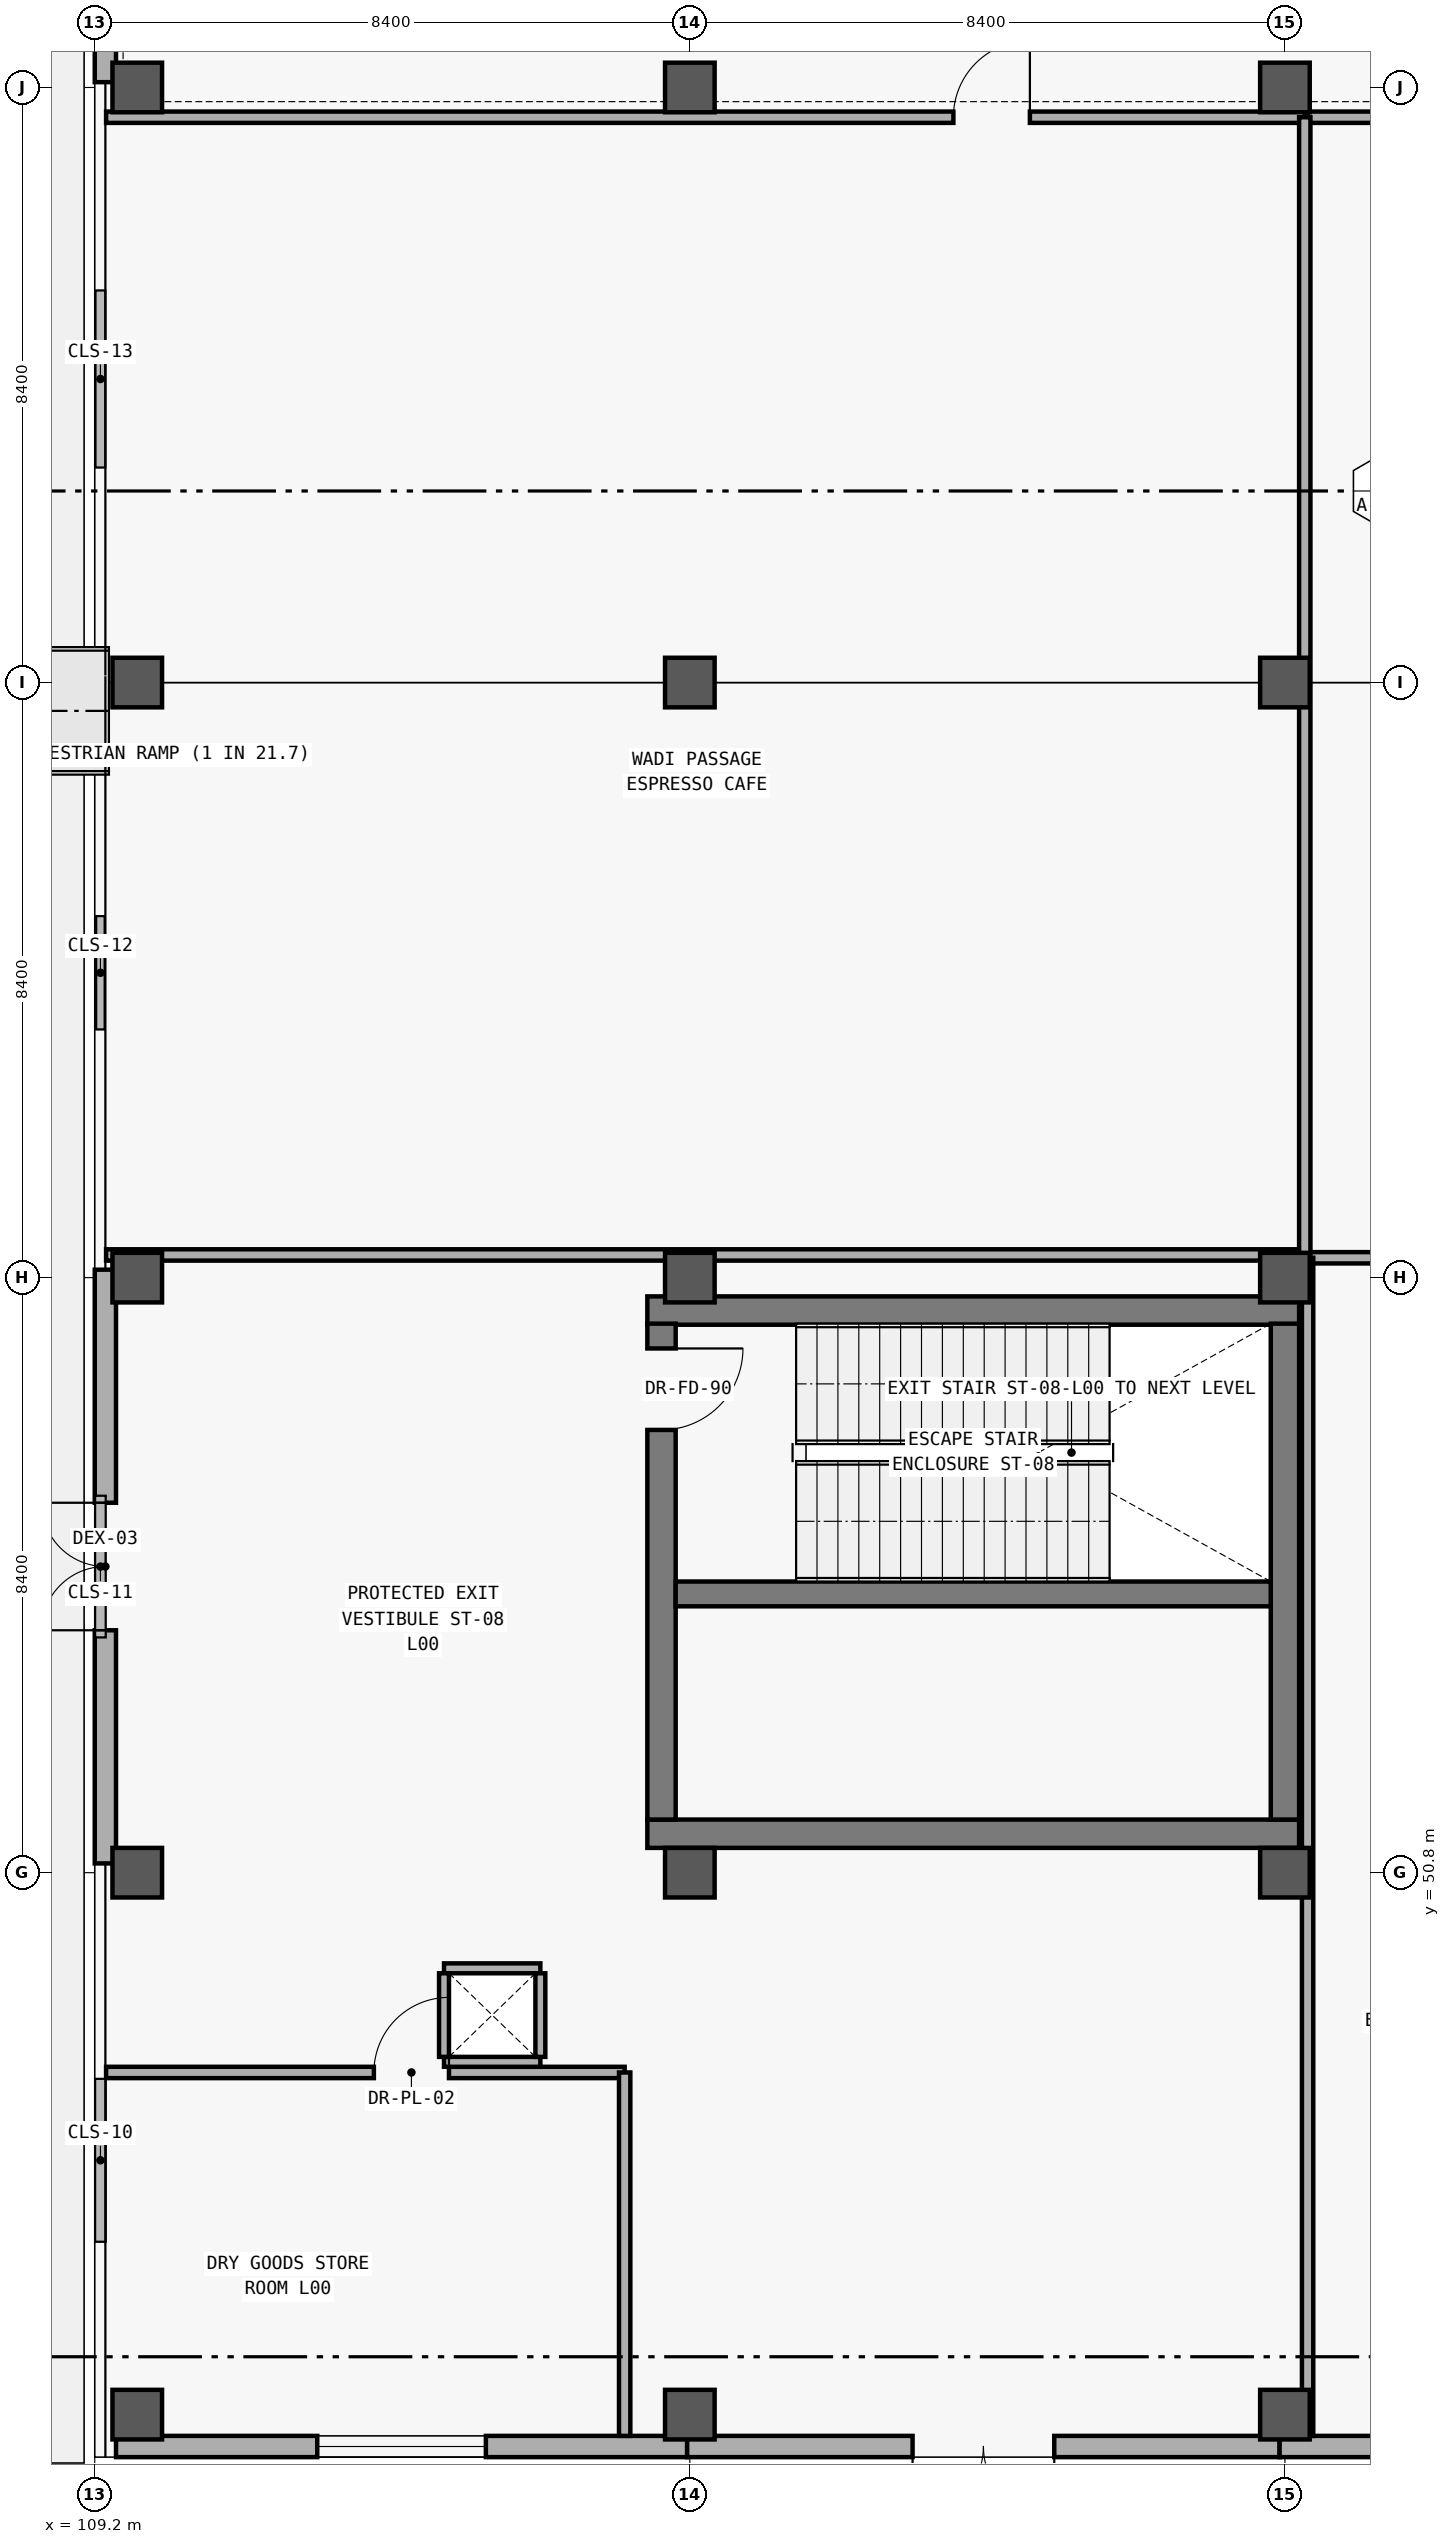
"""IFC4 building model, lengths in metres.
Left out: names, types, materials, properties, quantities, classifications, styles, units other than length and angle.
Written with IfcOpenShell. Run it as: python <this file> out.ifc"""

import sys

from ifc_helpers import new_model, si_unit, direction, frame, frame_2d, origin, origin_2d, place, context, subcontext, project, spatial, rectangle, extrude, element, fill, save


model = new_model("IFC4")
c1 = context("Model", 3, precision=1e-05, world=origin(), true_north=direction((0.0, 1.0)))
c2 = subcontext(c1, "Body", "Model", "MODEL_VIEW")
j1 = project(units=[si_unit("LENGTHUNIT", "METRE"), si_unit("PLANEANGLEUNIT", "RADIAN")], contexts=[c1])
p1 = place(None, origin())
s1 = spatial("IfcSite", under=j1, at=p1, CompositionType="ELEMENT")
p2 = place(p1, origin())
s2 = spatial("IfcBuilding", under=s1, at=p2, CompositionType="ELEMENT")
p3 = place(p2, origin())
s3 = spatial("IfcBuildingStorey", under=s2, at=p3, CompositionType="ELEMENT", Elevation=0.0)
for number, where, z_axis, x_axis in (
    (1, (109.8, 43.15, 0.0), (0.0, 0.0, 1.0), (1.0, 0.0, 0.0)),
    (2, (109.8, 50.8, 0.0), (0.0, 0.0, 1.0), (1.0, 0.0, 0.0)),
    (3, (109.8, 59.2, 0.0), (0.0, 0.0, 1.0), (1.0, 0.0, 0.0)),
    (4, (109.8, 67.6, 0.0), (0.0, 0.0, 1.0), (1.0, 0.0, 0.0)),
    (5, (109.8, 76.0, 0.0), (0.0, 0.0, 1.0), (1.0, 0.0, 0.0)),
    (6, (117.6, 43.15, 0.0), (0.0, 0.0, 1.0), (1.0, 0.0, 0.0)),
    (7, (117.6, 50.8, 0.0), (0.0, 0.0, 1.0), (1.0, 0.0, 0.0)),
    (8, (117.6, 59.2, 0.0), (0.0, 0.0, 1.0), (1.0, 0.0, 0.0)),
    (9, (117.6, 67.6, 0.0), (0.0, 0.0, 1.0), (1.0, 0.0, 0.0)),
    (10, (117.6, 76.0, 0.0), (0.0, 0.0, 1.0), (1.0, 0.0, 0.0)),
    (11, (126.0, 43.15, 0.0), (0.0, 0.0, 1.0), (1.0, 0.0, 0.0)),
    (12, (126.0, 50.8, 0.0), (0.0, 0.0, 1.0), (1.0, 0.0, 0.0)),
    (13, (126.0, 59.2, 0.0), (0.0, 0.0, 1.0), (1.0, 0.0, 0.0)),
    (14, (126.0, 67.6, 0.0), (0.0, 0.0, 1.0), (1.0, 0.0, 0.0)),
    (15, (126.0, 76.0, 0.0), (0.0, 0.0, 1.0), (1.0, 0.0, 0.0)),
):
    element("IfcColumn", number, at=place(p3, frame(where, z_axis=z_axis, x_axis=x_axis)), inside=s3, PredefinedType="COLUMN", context=c2, shape_type="SweptSolid", body=[
        extrude(rectangle(XDim=0.7, YDim=0.7, at=origin_2d()), origin(), (0.0, 0.0, 1.0), 5.4),
    ])
p4 = place(p3, frame((117.562, 42.7, 0.0), z_axis=(0.0, 0.0, 1.0), x_axis=(-1.0, 0.0, 0.0)))
e16 = element("IfcWall", 16, at=p4, inside=s3, PredefinedType="SOLIDWALL", context=c2, shape_type="SweptSolid", body=[
    extrude(rectangle(XDim=8.062, YDim=0.3, at=frame_2d((4.031, 0.0))), origin(), (0.0, 0.0, 1.0), 5.1),
])
p5 = place(p4, frame((2.841, 0.0, 0.9)))
e17 = element("IfcOpeningElement", 17, at=p5, cuts=e16, PredefinedType="OPENING", context=c2, shape_type="SweptSolid", body=[
    extrude(rectangle(XDim=2.38, YDim=1.95, at=frame_2d((1.19, 0.975))), frame((0.0, 0.16, 0.0), z_axis=(0.0, -1.0, 0.0), x_axis=(1.0, 0.0, 0.0)), (0.0, 0.0, 1.0), 0.32),
])
p6 = place(p3, frame((125.925, 42.7, 0.0), z_axis=(0.0, 0.0, 1.0), x_axis=(-1.0, 0.0, 0.0)))
e18 = element("IfcWall", 18, at=p6, inside=s3, PredefinedType="SOLIDWALL", context=c2, shape_type="SweptSolid", body=[
    extrude(rectangle(XDim=8.363, YDim=0.3, at=frame_2d((4.182, 0.0))), origin(), (0.0, 0.0, 1.0), 5.1),
])
p7 = place(p6, frame((3.181, 0.0, 0.0)))
e19 = element("IfcOpeningElement", 19, at=p7, cuts=e18, PredefinedType="OPENING", context=c2, shape_type="SweptSolid", body=[
    extrude(rectangle(XDim=2.0, YDim=2.6, at=frame_2d((1.0, 1.3))), frame((0.0, 0.16, 0.0), z_axis=(0.0, -1.0, 0.0), x_axis=(1.0, 0.0, 0.0)), (0.0, 0.0, 1.0), 0.32),
])
p8 = place(p3, frame((134.287, 42.7, 0.0), z_axis=(0.0, 0.0, 1.0), x_axis=(-1.0, 0.0, 0.0)))
e20 = element("IfcWall", 20, at=p8, inside=s3, PredefinedType="SOLIDWALL", context=c2, shape_type="SweptSolid", body=[
    extrude(rectangle(XDim=8.362, YDim=0.3, at=frame_2d((4.181, 0.0))), origin(), (0.0, 0.0, 1.0), 5.1),
])
p9 = place(p8, frame((3.181, 0.0, 0.0)))
e21 = element("IfcOpeningElement", 21, at=p9, cuts=e20, PredefinedType="OPENING", context=c2, shape_type="SweptSolid", body=[
    extrude(rectangle(XDim=2.0, YDim=2.6, at=frame_2d((1.0, 1.3))), frame((0.0, 0.16, 0.0), z_axis=(0.0, -1.0, 0.0), x_axis=(1.0, 0.0, 0.0)), (0.0, 0.0, 1.0), 0.32),
])
p10 = place(p3, frame((109.35, 50.931, 0.0), z_axis=(0.0, 0.0, 1.0), x_axis=(0.0, 1.0, 0.0)))
e22 = element("IfcWall", 22, at=p10, inside=s3, PredefinedType="SOLIDWALL", context=c2, shape_type="SweptSolid", body=[
    extrude(rectangle(XDim=8.381, YDim=0.3, at=frame_2d((4.19, 0.0))), origin(), (0.0, 0.0, 1.0), 5.1),
])
p11 = place(p10, frame((3.291, 0.0, 0.0)))
e23 = element("IfcOpeningElement", 23, at=p11, cuts=e22, PredefinedType="OPENING", context=c2, shape_type="SweptSolid", body=[
    extrude(rectangle(XDim=1.8, YDim=2.4, at=frame_2d((0.9, 1.2))), frame((0.0, 0.16, 0.0), z_axis=(0.0, -1.0, 0.0), x_axis=(1.0, 0.0, 0.0)), (0.0, 0.0, 1.0), 0.32),
])
p12 = place(p3, frame((109.35, 76.075, 0.0), z_axis=(0.0, 0.0, 1.0), x_axis=(0.0, 1.0, 0.0)))
e24 = element("IfcWall", 24, at=p12, inside=s3, PredefinedType="SOLIDWALL", context=c2, shape_type="SweptSolid", body=[
    extrude(rectangle(XDim=8.381, YDim=0.3, at=frame_2d((4.19, 0.0))), origin(), (0.0, 0.0, 1.0), 5.1),
])
p13 = place(p12, frame((2.291, 0.0, 0.9)))
e25 = element("IfcOpeningElement", 25, at=p13, cuts=e24, PredefinedType="OPENING", context=c2, shape_type="SweptSolid", body=[
    extrude(rectangle(XDim=3.8, YDim=2.25, at=frame_2d((1.9, 1.125))), frame((0.0, 0.16, 0.0), z_axis=(0.0, -1.0, 0.0), x_axis=(1.0, 0.0, 0.0)), (0.0, 0.0, 1.0), 0.32),
])
for number, where, z_axis, x_axis in (
    (26, (117.0, 51.35, 0.0), (0.0, 0.0, 1.0), (1.0, 0.0, 0.0)),
    (27, (126.2, 58.735, 0.0), (0.0, 0.0, 1.0), (-1.0, 0.0, 0.0)),
):
    element("IfcWall", number, at=place(p3, frame(where, z_axis=z_axis, x_axis=x_axis)), inside=s3, PredefinedType="SHEAR", context=c2, shape_type="SweptSolid", body=[
        extrude(rectangle(XDim=9.2, YDim=0.4, at=frame_2d((4.6, 0.0))), origin(), (0.0, 0.0, 1.0), 5.08),
    ])
p14 = place(p3, frame((117.2, 58.55, 0.0), z_axis=(0.0, 0.0, 1.0), x_axis=(0.0, -1.0, 0.0)))
e28 = element("IfcWall", 28, at=p14, inside=s3, PredefinedType="SHEAR", context=c2, shape_type="SweptSolid", body=[
    extrude(rectangle(XDim=7.0, YDim=0.4, at=frame_2d((3.5, 0.0))), origin(), (0.0, 0.0, 1.0), 5.08),
])
p15 = place(p14, frame((0.35, 0.0, 0.0)))
e29 = element("IfcOpeningElement", 29, at=p15, cuts=e28, PredefinedType="OPENING", context=c2, shape_type="SweptSolid", body=[
    extrude(rectangle(XDim=1.15, YDim=2.2, at=frame_2d((0.575, 1.1))), frame((0.0, 0.21, 0.0), z_axis=(0.0, -1.0, 0.0), x_axis=(1.0, 0.0, 0.0)), (0.0, 0.0, 1.0), 0.42),
])
p16 = place(p3, frame((126.0, 51.55, 0.0), z_axis=(0.0, 0.0, 1.0), x_axis=(0.0, 1.0, 0.0)))
e30 = element("IfcWall", 30, at=p16, inside=s3, PredefinedType="SHEAR", context=c2, shape_type="SweptSolid", body=[
    extrude(rectangle(XDim=7.0, YDim=0.4, at=frame_2d((3.5, 0.0))), origin(), (0.0, 0.0, 1.0), 5.08),
])
p17 = place(p3, frame((117.4, 54.735, 0.0), z_axis=(0.0, 0.0, 1.0), x_axis=(1.0, 0.0, 0.0)))
e31 = element("IfcWall", 31, at=p17, inside=s3, PredefinedType="SHEAR", context=c2, shape_type="SweptSolid", body=[
    extrude(rectangle(XDim=8.4, YDim=0.35, at=frame_2d((4.2, 0.0))), origin(), (0.0, 0.0, 1.0), 5.08),
])
p18 = place(p3, frame((109.36, 75.58, 0.0), z_axis=(0.0, 0.0, 1.0), x_axis=(1.0, 0.0, 0.0)))
e32 = element("IfcWall", 32, at=p18, inside=s3, PredefinedType="PARTITIONING", context=c2, shape_type="SweptSolid", body=[
    extrude(rectangle(XDim=16.92, YDim=0.16, at=frame_2d((8.46, 0.0))), origin(), (0.0, 0.0, 1.0), 4.18),
])
p19 = place(p18, frame((11.96, 0.0, 0.0)))
e33 = element("IfcOpeningElement", 33, at=p19, cuts=e32, PredefinedType="OPENING", context=c2, shape_type="SweptSolid", body=[
    extrude(rectangle(XDim=1.08, YDim=2.25, at=frame_2d((0.54, 1.125))), frame((0.0, 0.09, 0.0), z_axis=(0.0, -1.0, 0.0), x_axis=(1.0, 0.0, 0.0)), (0.0, 0.0, 1.0), 0.18),
])
p20 = place(p3, frame((126.32, 75.58, 0.0), z_axis=(0.0, 0.0, 1.0), x_axis=(1.0, 0.0, 0.0)))
e34 = element("IfcWall", 34, at=p20, inside=s3, PredefinedType="PARTITIONING", context=c2, shape_type="SweptSolid", body=[
    extrude(rectangle(XDim=16.03, YDim=0.16, at=frame_2d((8.015, 0.0))), origin(), (0.0, 0.0, 1.0), 4.18),
])
p21 = place(p20, frame((2.809, 0.0, 0.0)))
e35 = element("IfcOpeningElement", 35, at=p21, cuts=e34, PredefinedType="OPENING", context=c2, shape_type="SweptSolid", body=[
    extrude(rectangle(XDim=1.55, YDim=2.25, at=frame_2d((0.775, 1.125))), frame((0.0, 0.09, 0.0), z_axis=(0.0, -1.0, 0.0), x_axis=(1.0, 0.0, 0.0)), (0.0, 0.0, 1.0), 0.18),
])
p22 = place(p3, frame((126.32, 59.48, 0.0), z_axis=(0.0, 0.0, 1.0), x_axis=(1.0, 0.0, 0.0)))
e36 = element("IfcWall", 36, at=p22, inside=s3, PredefinedType="PARTITIONING", context=c2, shape_type="SweptSolid", body=[
    extrude(rectangle(XDim=16.03, YDim=0.16, at=frame_2d((8.015, 0.0))), origin(), (0.0, 0.0, 1.0), 4.18),
])
p23 = place(p22, frame((3.02, 0.0, 0.0)))
e37 = element("IfcOpeningElement", 37, at=p23, cuts=e36, PredefinedType="OPENING", context=c2, shape_type="SweptSolid", body=[
    extrude(rectangle(XDim=1.08, YDim=2.25, at=frame_2d((0.54, 1.125))), frame((0.0, 0.09, 0.0), z_axis=(0.0, -1.0, 0.0), x_axis=(1.0, 0.0, 0.0)), (0.0, 0.0, 1.0), 0.18),
])
p24 = place(p3, frame((109.36, 47.98, 0.0), z_axis=(0.0, 0.0, 1.0), x_axis=(1.0, 0.0, 0.0)))
e38 = element("IfcWall", 38, at=p24, inside=s3, PredefinedType="PARTITIONING", context=c2, shape_type="SweptSolid", body=[
    extrude(rectangle(XDim=7.32, YDim=0.16, at=frame_2d((3.66, 0.0))), origin(), (0.0, 0.0, 1.0), 4.18),
])
p25 = place(p24, frame((3.78, 0.0, 0.0)))
e39 = element("IfcOpeningElement", 39, at=p25, cuts=e38, PredefinedType="OPENING", context=c2, shape_type="SweptSolid", body=[
    extrude(rectangle(XDim=1.06, YDim=2.2, at=frame_2d((0.53, 1.1))), frame((0.0, 0.09, 0.0), z_axis=(0.0, -1.0, 0.0), x_axis=(1.0, 0.0, 0.0)), (0.0, 0.0, 1.0), 0.18),
])
p26 = place(p3, frame((109.36, 59.52, 0.0), z_axis=(0.0, 0.0, 1.0), x_axis=(1.0, 0.0, 0.0)))
e40 = element("IfcWall", 40, at=p26, inside=s3, PredefinedType="PARTITIONING", context=c2, shape_type="SweptSolid", body=[
    extrude(rectangle(XDim=16.92, YDim=0.16, at=frame_2d((8.46, 0.0))), origin(), (0.0, 0.0, 1.0), 4.18),
])
p27 = place(p3, frame((126.28, 59.52, 0.0), z_axis=(0.0, 0.0, 1.0), x_axis=(0.0, 1.0, 0.0)))
e41 = element("IfcWall", 41, at=p27, inside=s3, PredefinedType="PARTITIONING", context=c2, shape_type="SweptSolid", body=[
    extrude(rectangle(XDim=16.06, YDim=0.16, at=frame_2d((8.03, 0.0))), origin(), (0.0, 0.0, 1.0), 4.18),
])
p28 = place(p3, frame((126.32, 42.85, 0.0), z_axis=(0.0, 0.0, 1.0), x_axis=(0.0, 1.0, 0.0)))
e42 = element("IfcWall", 42, at=p28, inside=s3, PredefinedType="PARTITIONING", context=c2, shape_type="SweptSolid", body=[
    extrude(rectangle(XDim=16.63, YDim=0.16, at=frame_2d((8.315, 0.0))), origin(), (0.0, 0.0, 1.0), 4.18),
])
p29 = place(p3, frame((116.68, 42.85, 0.0), z_axis=(0.0, 0.0, 1.0), x_axis=(0.0, 1.0, 0.0)))
e43 = element("IfcWall", 43, at=p29, inside=s3, PredefinedType="PARTITIONING", context=c2, shape_type="SweptSolid", body=[
    extrude(rectangle(XDim=5.13, YDim=0.16, at=frame_2d((2.565, 0.0))), origin(), (0.0, 0.0, 1.0), 4.18),
])
for number, where, z_axis, x_axis in (
    (44, (114.13, 48.13, 0.0), (0.0, 0.0, 1.0), (1.0, 0.0, 0.0)),
    (45, (115.49, 49.45, 0.0), (0.0, 0.0, 1.0), (-1.0, 0.0, 0.0)),
):
    element("IfcWall", number, at=place(p3, frame(where, z_axis=z_axis, x_axis=x_axis)), inside=s3, PredefinedType="PARTITIONING", context=c2, shape_type="SweptSolid", body=[
        extrude(rectangle(XDim=1.36, YDim=0.14, at=frame_2d((0.68, 0.0))), origin(), (0.0, 0.0, 1.0), 4.2),
    ])
for number, where, z_axis, x_axis in (
    (46, (114.13, 49.38, 0.0), (0.0, 0.0, 1.0), (0.0, -1.0, 0.0)),
    (47, (115.49, 48.2, 0.0), (0.0, 0.0, 1.0), (0.0, 1.0, 0.0)),
):
    element("IfcWall", number, at=place(p3, frame(where, z_axis=z_axis, x_axis=x_axis)), inside=s3, PredefinedType="PARTITIONING", context=c2, shape_type="SweptSolid", body=[
        extrude(rectangle(XDim=1.18, YDim=0.14, at=frame_2d((0.59, 0.0))), origin(), (0.0, 0.0, 1.0), 4.2),
    ])
p30 = place(p5, origin())
e48 = element("IfcWindow", 48, at=p30, inside=s3, PartitioningType="SINGLE_PANEL", PredefinedType="WINDOW", context=c2, shape_type="SweptSolid", body=[
    extrude(rectangle(XDim=2.38, YDim=1.95, at=frame_2d((1.19, 0.975))), frame((0.0, 0.03, 0.0), z_axis=(0.0, -1.0, 0.0), x_axis=(1.0, 0.0, 0.0)), (0.0, 0.0, 1.0), 0.06),
])
fill(e17, e48)
p31 = place(p7, origin())
e49 = element("IfcDoor", 49, at=p31, inside=s3, OperationType="DOUBLE_DOOR_SINGLE_SWING", PredefinedType="DOOR", context=c2, shape_type="SweptSolid", body=[
    extrude(rectangle(XDim=2.0, YDim=2.6, at=frame_2d((1.0, 1.3))), frame((0.0, 0.025, 0.0), z_axis=(0.0, -1.0, 0.0), x_axis=(1.0, 0.0, 0.0)), (0.0, 0.0, 1.0), 0.05),
])
fill(e19, e49)
p32 = place(p11, origin())
e50 = element("IfcDoor", 50, at=p32, inside=s3, OperationType="DOUBLE_DOOR_SINGLE_SWING", PredefinedType="DOOR", context=c2, shape_type="SweptSolid", body=[
    extrude(rectangle(XDim=1.8, YDim=2.4, at=frame_2d((0.9, 1.2))), frame((0.0, 0.025, 0.0), z_axis=(0.0, -1.0, 0.0), x_axis=(1.0, 0.0, 0.0)), (0.0, 0.0, 1.0), 0.05),
])
fill(e23, e50)
p33 = place(p15, origin())
e51 = element("IfcDoor", 51, at=p33, inside=s3, OperationType="SINGLE_SWING_LEFT", PredefinedType="DOOR", context=c2, shape_type="SweptSolid", body=[
    extrude(rectangle(XDim=1.15, YDim=2.2, at=frame_2d((0.575, 1.1))), frame((0.0, 0.025, 0.0), z_axis=(0.0, -1.0, 0.0), x_axis=(1.0, 0.0, 0.0)), (0.0, 0.0, 1.0), 0.05),
])
fill(e29, e51)
p34 = place(p19, origin())
e52 = element("IfcDoor", 52, at=p34, inside=s3, OperationType="SINGLE_SWING_RIGHT", PredefinedType="DOOR", context=c2, shape_type="SweptSolid", body=[
    extrude(rectangle(XDim=1.08, YDim=2.25, at=frame_2d((0.54, 1.125))), frame((0.0, 0.025, 0.0), z_axis=(0.0, -1.0, 0.0), x_axis=(1.0, 0.0, 0.0)), (0.0, 0.0, 1.0), 0.05),
])
fill(e33, e52)
p35 = place(p25, origin())
e53 = element("IfcDoor", 53, at=p35, inside=s3, OperationType="SINGLE_SWING_RIGHT", PredefinedType="DOOR", context=c2, shape_type="SweptSolid", body=[
    extrude(rectangle(XDim=1.06, YDim=2.2, at=frame_2d((0.53, 1.1))), frame((0.0, 0.025, 0.0), z_axis=(0.0, -1.0, 0.0), x_axis=(1.0, 0.0, 0.0)), (0.0, 0.0, 1.0), 0.05),
])
fill(e39, e53)
save(model, sys.argv[1])
